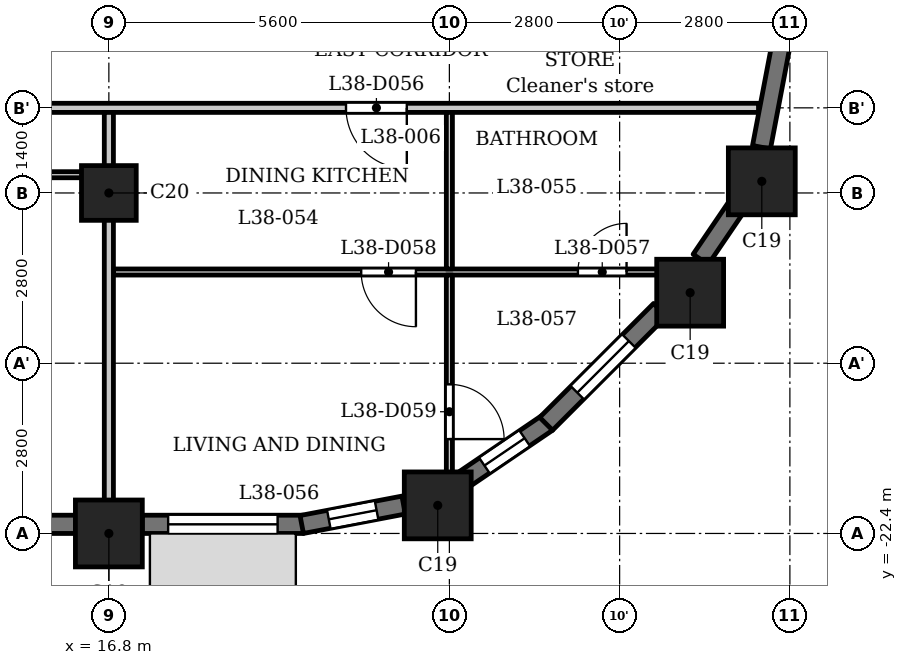
"""IFC4 building model, lengths in metres.
Left out: names, types, materials, properties, quantities, classifications, styles, units other than length and angle.
Written with IfcOpenShell. Run it as: python <this file> out.ifc"""

import sys

from ifc_helpers import new_model, si_unit, direction, frame, frame_2d, origin, origin_2d, place, context, subcontext, project, spatial, rectangle, extrude, element, fill, save


model = new_model("IFC4")
c1 = context("Model", 3, precision=1e-05, world=origin(), true_north=direction((0.0, 1.0)))
c2 = subcontext(c1, "Body", "Model", "MODEL_VIEW")
j1 = project(units=[si_unit("LENGTHUNIT", "METRE"), si_unit("PLANEANGLEUNIT", "RADIAN")], contexts=[c1])
p1 = place(None, origin())
s1 = spatial("IfcSite", under=j1, at=p1, CompositionType="ELEMENT")
p2 = place(p1, origin())
s2 = spatial("IfcBuilding", under=s1, at=p2, CompositionType="ELEMENT")
p3 = place(p2, frame((0.0, 0.0, 150.1)))
s3 = spatial("IfcBuildingStorey", under=s2, at=p3, CompositionType="ELEMENT", Elevation=150.1)
for number, where, z_axis, x_axis in (
    (1, (16.8, -22.4, 0.0), (0.0, 0.0, 1.0), (1.0, 0.0, 0.0)),
    (2, (22.209, -21.938, 0.0), (0.0, 0.0, 1.0), (1.0, 0.0, 0.0)),
    (3, (26.36, -18.44, 0.0), (0.0, 0.0, 1.0), (1.0, 0.0, 0.0)),
    (4, (27.538, -16.609, 0.0), (0.0, 0.0, 1.0), (1.0, 0.0, 0.0)),
):
    element("IfcColumn", number, at=place(p3, frame(where, z_axis=z_axis, x_axis=x_axis)), inside=s3, PredefinedType="COLUMN", context=c2, shape_type="SweptSolid", body=[
        extrude(rectangle(XDim=1.1, YDim=1.1, at=origin_2d()), origin(), (0.0, 0.0, 1.0), 3.5),
    ])
p4 = place(p3, frame((16.8, -16.8, 0.0), z_axis=(0.0, 0.0, 1.0), x_axis=(1.0, 0.0, 0.0)))
e5 = element("IfcColumn", 5, at=p4, inside=s3, PredefinedType="COLUMN", context=c2, shape_type="SweptSolid", body=[
    extrude(rectangle(XDim=0.9, YDim=0.9, at=origin_2d()), origin(), (0.0, 0.0, 1.0), 3.5),
])
p5 = place(p3, frame((11.75, -22.25, 0.0), z_axis=(0.0, 0.0, 1.0), x_axis=(1.0, 0.0, 0.0)))
e6 = element("IfcWall", 6, at=p5, inside=s3, PredefinedType="SOLIDWALL", context=c2, shape_type="SweptSolid", body=[
    extrude(rectangle(XDim=4.5, YDim=0.3, at=frame_2d((2.25, 0.0))), origin(), (0.0, 0.0, 1.0), 2.45),
])
p6 = place(p5, frame((0.45, 0.0, 1.2)))
e7 = element("IfcOpeningElement", 7, at=p6, cuts=e6, PredefinedType="OPENING", context=c2, shape_type="SweptSolid", body=[
    extrude(rectangle(XDim=3.6, YDim=0.95, at=frame_2d((1.8, 0.475))), frame((0.0, 0.16, 0.0), z_axis=(0.0, -1.0, 0.0), x_axis=(1.0, 0.0, 0.0)), (0.0, 0.0, 1.0), 0.32),
])
p7 = place(p3, frame((17.35, -22.25, 0.0), z_axis=(0.0, 0.0, 1.0), x_axis=(1.0, 0.0, 0.0)))
e8 = element("IfcWall", 8, at=p7, inside=s3, PredefinedType="SOLIDWALL", context=c2, shape_type="SweptSolid", body=[
    extrude(rectangle(XDim=2.65, YDim=0.3, at=frame_2d((1.325, 0.0))), origin(), (0.0, 0.0, 1.0), 2.45),
])
p8 = place(p7, frame((0.425, 0.0, 0.9)))
e9 = element("IfcOpeningElement", 9, at=p8, cuts=e8, PredefinedType="OPENING", context=c2, shape_type="SweptSolid", body=[
    extrude(rectangle(XDim=1.8, YDim=1.25, at=frame_2d((0.9, 0.625))), frame((0.0, 0.16, 0.0), z_axis=(0.0, -1.0, 0.0), x_axis=(1.0, 0.0, 0.0)), (0.0, 0.0, 1.0), 0.32),
])
p9 = place(p3, frame((19.972, -22.253, 0.0), z_axis=(0.0, 0.0, 1.0), x_axis=(0.982297206936, 0.187329114784, 0.0)))
e10 = element("IfcWall", 10, at=p9, inside=s3, PredefinedType="SOLIDWALL", context=c2, shape_type="SweptSolid", body=[
    extrude(rectangle(XDim=1.706, YDim=0.3, at=frame_2d((0.853, 0.0))), origin(), (0.0, 0.0, 1.0), 2.45),
])
p10 = place(p9, frame((0.453, 0.0, 0.6)))
e11 = element("IfcOpeningElement", 11, at=p10, cuts=e10, PredefinedType="OPENING", context=c2, shape_type="SweptSolid", body=[
    extrude(rectangle(XDim=0.8, YDim=1.55, at=frame_2d((0.4, 0.775))), frame((0.0, 0.16, 0.0), z_axis=(0.0, -1.0, 0.0), x_axis=(1.0, 0.0, 0.0)), (0.0, 0.0, 1.0), 0.32),
])
p11 = place(p3, frame((22.602, -21.538, 0.0), z_axis=(0.0, 0.0, 1.0), x_axis=(0.827040942766, 0.562141689424, 0.0)))
e12 = element("IfcWall", 12, at=p11, inside=s3, PredefinedType="SOLIDWALL", context=c2, shape_type="SweptSolid", body=[
    extrude(rectangle(XDim=1.706, YDim=0.3, at=frame_2d((0.853, 0.0))), origin(), (0.0, 0.0, 1.0), 2.45),
])
p12 = place(p11, frame((0.453, 0.0, 0.6)))
e13 = element("IfcOpeningElement", 13, at=p12, cuts=e12, PredefinedType="OPENING", context=c2, shape_type="SweptSolid", body=[
    extrude(rectangle(XDim=0.8, YDim=1.55, at=frame_2d((0.4, 0.775))), frame((0.0, 0.16, 0.0), z_axis=(0.0, -1.0, 0.0), x_axis=(1.0, 0.0, 0.0)), (0.0, 0.0, 1.0), 0.32),
])
p13 = place(p3, frame((23.991, -20.597, 0.0), z_axis=(0.0, 0.0, 1.0), x_axis=(0.707106781187, 0.707106781187, 0.0)))
e14 = element("IfcWall", 14, at=p13, inside=s3, PredefinedType="SOLIDWALL", context=c2, shape_type="SweptSolid", body=[
    extrude(rectangle(XDim=2.65, YDim=0.3, at=frame_2d((1.325, 0.0))), origin(), (0.0, 0.0, 1.0), 2.45),
])
p14 = place(p13, frame((0.725, 0.0, 0.6)))
e15 = element("IfcOpeningElement", 15, at=p14, cuts=e14, PredefinedType="OPENING", context=c2, shape_type="SweptSolid", body=[
    extrude(rectangle(XDim=1.2, YDim=1.55, at=frame_2d((0.6, 0.775))), frame((0.0, 0.16, 0.0), z_axis=(0.0, -1.0, 0.0), x_axis=(1.0, 0.0, 0.0)), (0.0, 0.0, 1.0), 0.32),
])
p15 = place(p3, frame((26.532, -17.893, 0.0), z_axis=(0.0, 0.0, 1.0), x_axis=(0.562105419172, 0.82706559458, 0.0)))
e16 = element("IfcWall", 16, at=p15, inside=s3, PredefinedType="SOLIDWALL", context=c2, shape_type="SweptSolid", body=[
    extrude(rectangle(XDim=1.077, YDim=0.3, at=frame_2d((0.539, 0.0))), origin(), (0.0, 0.0, 1.0), 3.2),
])
p16 = place(p3, frame((27.533, -16.048, 0.0), z_axis=(0.0, 0.0, 1.0), x_axis=(0.187302784601, 0.982302227871, 0.0)))
e17 = element("IfcWall", 17, at=p16, inside=s3, PredefinedType="SOLIDWALL", context=c2, shape_type="SweptSolid", body=[
    extrude(rectangle(XDim=1.706, YDim=0.3, at=frame_2d((0.853, 0.0))), origin(), (0.0, 0.0, 1.0), 2.45),
])
p17 = place(p3, frame((16.875, -18.1, 0.0), z_axis=(0.0, 0.0, 1.0), x_axis=(1.0, 0.0, 0.0)))
e18 = element("IfcWall", 18, at=p17, inside=s3, PredefinedType="PARTITIONING", context=c2, shape_type="SweptSolid", body=[
    extrude(rectangle(XDim=9.565, YDim=0.1, at=frame_2d((4.782, 0.0))), origin(), (0.0, 0.0, 1.0), 3.2),
])
p18 = place(p17, frame((7.639, 0.0, 0.0)))
e19 = element("IfcOpeningElement", 19, at=p18, cuts=e18, PredefinedType="OPENING", context=c2, shape_type="SweptSolid", body=[
    extrude(rectangle(XDim=0.8, YDim=2.1, at=frame_2d((0.4, 1.05))), frame((0.0, 0.06, 0.0), z_axis=(0.0, -1.0, 0.0), x_axis=(1.0, 0.0, 0.0)), (0.0, 0.0, 1.0), 0.12),
])
p19 = place(p17, frame((4.075, 0.0, 0.0)))
e20 = element("IfcOpeningElement", 20, at=p19, cuts=e18, PredefinedType="OPENING", context=c2, shape_type="SweptSolid", body=[
    extrude(rectangle(XDim=0.9, YDim=2.1, at=frame_2d((0.45, 1.05))), frame((0.0, 0.06, 0.0), z_axis=(0.0, -1.0, 0.0), x_axis=(1.0, 0.0, 0.0)), (0.0, 0.0, 1.0), 0.12),
])
p20 = place(p3, frame((-16.725, -16.5, 0.0), z_axis=(0.0, 0.0, 1.0), x_axis=(1.0, 0.0, 0.0)))
e21 = element("IfcWall", 21, at=p20, inside=s3, PredefinedType="PARTITIONING", context=c2, shape_type="SweptSolid", body=[
    extrude(rectangle(XDim=33.45, YDim=0.1, at=frame_2d((16.725, 0.0))), origin(), (0.0, 0.0, 1.0), 3.2),
])
p21 = place(p20, frame((9.675, 0.0, 0.0)))
e22 = element("IfcOpeningElement", 22, at=p21, cuts=e21, PredefinedType="OPENING", context=c2, shape_type="SweptSolid", body=[
    extrude(rectangle(XDim=0.8, YDim=2.1, at=frame_2d((0.4, 1.05))), frame((0.0, 0.06, 0.0), z_axis=(0.0, -1.0, 0.0), x_axis=(1.0, 0.0, 0.0)), (0.0, 0.0, 1.0), 0.12),
])
p22 = place(p20, frame((4.075, 0.0, 0.0)))
e23 = element("IfcOpeningElement", 23, at=p22, cuts=e21, PredefinedType="OPENING", context=c2, shape_type="SweptSolid", body=[
    extrude(rectangle(XDim=0.9, YDim=2.1, at=frame_2d((0.45, 1.05))), frame((0.0, 0.06, 0.0), z_axis=(0.0, -1.0, 0.0), x_axis=(1.0, 0.0, 0.0)), (0.0, 0.0, 1.0), 0.12),
])
p23 = place(p20, frame((20.875, 0.0, 0.0)))
e24 = element("IfcOpeningElement", 24, at=p23, cuts=e21, PredefinedType="OPENING", context=c2, shape_type="SweptSolid", body=[
    extrude(rectangle(XDim=0.8, YDim=2.1, at=frame_2d((0.4, 1.05))), frame((0.0, 0.06, 0.0), z_axis=(0.0, -1.0, 0.0), x_axis=(1.0, 0.0, 0.0)), (0.0, 0.0, 1.0), 0.12),
])
p24 = place(p20, frame((15.275, 0.0, 0.0)))
e25 = element("IfcOpeningElement", 25, at=p24, cuts=e21, PredefinedType="OPENING", context=c2, shape_type="SweptSolid", body=[
    extrude(rectangle(XDim=0.9, YDim=2.1, at=frame_2d((0.45, 1.05))), frame((0.0, 0.06, 0.0), z_axis=(0.0, -1.0, 0.0), x_axis=(1.0, 0.0, 0.0)), (0.0, 0.0, 1.0), 0.12),
])
p25 = place(p20, frame((26.475, 0.0, 0.0)))
e26 = element("IfcOpeningElement", 26, at=p25, cuts=e21, PredefinedType="OPENING", context=c2, shape_type="SweptSolid", body=[
    extrude(rectangle(XDim=0.8, YDim=2.1, at=frame_2d((0.4, 1.05))), frame((0.0, 0.06, 0.0), z_axis=(0.0, -1.0, 0.0), x_axis=(1.0, 0.0, 0.0)), (0.0, 0.0, 1.0), 0.12),
])
p26 = place(p20, frame((30.575, 0.0, 0.0)))
e27 = element("IfcOpeningElement", 27, at=p26, cuts=e21, PredefinedType="OPENING", context=c2, shape_type="SweptSolid", body=[
    extrude(rectangle(XDim=0.9, YDim=2.1, at=frame_2d((0.45, 1.05))), frame((0.0, 0.06, 0.0), z_axis=(0.0, -1.0, 0.0), x_axis=(1.0, 0.0, 0.0)), (0.0, 0.0, 1.0), 0.12),
])
p27 = place(p3, frame((14.925, -15.4, 0.0), z_axis=(0.0, 0.0, 1.0), x_axis=(1.0, 0.0, 0.0)))
e28 = element("IfcWall", 28, at=p27, inside=s3, PredefinedType="PARTITIONING", context=c2, shape_type="SweptSolid", body=[
    extrude(rectangle(XDim=12.559, YDim=0.15, at=frame_2d((6.279, 0.0))), origin(), (0.0, 0.0, 1.0), 3.2),
])
p28 = place(p27, frame((5.775, 0.0, 0.0)))
e29 = element("IfcOpeningElement", 29, at=p28, cuts=e28, PredefinedType="OPENING", context=c2, shape_type="SweptSolid", body=[
    extrude(rectangle(XDim=1.0, YDim=2.1, at=frame_2d((0.5, 1.05))), frame((0.0, 0.085, 0.0), z_axis=(0.0, -1.0, 0.0), x_axis=(1.0, 0.0, 0.0)), (0.0, 0.0, 1.0), 0.17),
])
p29 = place(p3, frame((16.8, -22.93, 0.0), z_axis=(0.0, 0.0, 1.0), x_axis=(0.0, 1.0, 0.0)))
e30 = element("IfcWall", 30, at=p29, inside=s3, PredefinedType="PARTITIONING", context=c2, shape_type="SweptSolid", body=[
    extrude(rectangle(XDim=7.455, YDim=0.15, at=frame_2d((3.728, 0.0))), origin(), (0.0, 0.0, 1.0), 3.2),
])
p30 = place(p3, frame((22.4, -21.72, 0.0), z_axis=(0.0, 0.0, 1.0), x_axis=(0.0, 1.0, 0.0)))
e31 = element("IfcWall", 31, at=p30, inside=s3, PredefinedType="PARTITIONING", context=c2, shape_type="SweptSolid", body=[
    extrude(rectangle(XDim=3.57, YDim=0.1, at=frame_2d((1.785, 0.0))), origin(), (0.0, 0.0, 1.0), 3.2),
])
p31 = place(p30, frame((0.872, 0.0, 0.0)))
e32 = element("IfcOpeningElement", 32, at=p31, cuts=e31, PredefinedType="OPENING", context=c2, shape_type="SweptSolid", body=[
    extrude(rectangle(XDim=0.9, YDim=2.1, at=frame_2d((0.45, 1.05))), frame((0.0, 0.06, 0.0), z_axis=(0.0, -1.0, 0.0), x_axis=(1.0, 0.0, 0.0)), (0.0, 0.0, 1.0), 0.12),
])
p32 = place(p3, frame((22.4, -18.05, 0.0), z_axis=(0.0, 0.0, 1.0), x_axis=(0.0, 1.0, 0.0)))
e33 = element("IfcWall", 33, at=p32, inside=s3, PredefinedType="PARTITIONING", context=c2, shape_type="SweptSolid", body=[
    extrude(rectangle(XDim=2.575, YDim=0.1, at=frame_2d((1.288, 0.0))), origin(), (0.0, 0.0, 1.0), 3.2),
])
p33 = place(p28, origin())
e34 = element("IfcDoor", 34, at=p33, inside=s3, OperationType="SINGLE_SWING_RIGHT", PredefinedType="DOOR", context=c2, shape_type="SweptSolid", body=[
    extrude(rectangle(XDim=1.0, YDim=2.1, at=frame_2d((0.5, 1.05))), frame((0.0, 0.025, 0.0), z_axis=(0.0, -1.0, 0.0), x_axis=(1.0, 0.0, 0.0)), (0.0, 0.0, 1.0), 0.05),
])
fill(e29, e34)
p34 = place(p18, origin())
e35 = element("IfcDoor", 35, at=p34, inside=s3, OperationType="SINGLE_SWING_LEFT", PredefinedType="DOOR", context=c2, shape_type="SweptSolid", body=[
    extrude(rectangle(XDim=0.8, YDim=2.1, at=frame_2d((0.4, 1.05))), frame((0.0, 0.025, 0.0), z_axis=(0.0, -1.0, 0.0), x_axis=(1.0, 0.0, 0.0)), (0.0, 0.0, 1.0), 0.05),
])
fill(e19, e35)
p35 = place(p19, origin())
e36 = element("IfcDoor", 36, at=p35, inside=s3, OperationType="SINGLE_SWING_RIGHT", PredefinedType="DOOR", context=c2, shape_type="SweptSolid", body=[
    extrude(rectangle(XDim=0.9, YDim=2.1, at=frame_2d((0.45, 1.05))), frame((0.0, 0.025, 0.0), z_axis=(0.0, -1.0, 0.0), x_axis=(1.0, 0.0, 0.0)), (0.0, 0.0, 1.0), 0.05),
])
fill(e20, e36)
p36 = place(p31, origin())
e37 = element("IfcDoor", 37, at=p36, inside=s3, OperationType="SINGLE_SWING_LEFT", PredefinedType="DOOR", context=c2, shape_type="SweptSolid", body=[
    extrude(rectangle(XDim=0.9, YDim=2.1, at=frame_2d((0.45, 1.05))), frame((0.0, 0.025, 0.0), z_axis=(0.0, -1.0, 0.0), x_axis=(1.0, 0.0, 0.0)), (0.0, 0.0, 1.0), 0.05),
])
fill(e32, e37)
p37 = place(p8, origin())
e38 = element("IfcWindow", 38, at=p37, inside=s3, PartitioningType="SINGLE_PANEL", PredefinedType="WINDOW", context=c2, shape_type="SweptSolid", body=[
    extrude(rectangle(XDim=1.8, YDim=1.25, at=frame_2d((0.9, 0.625))), frame((0.0, 0.03, 0.0), z_axis=(0.0, -1.0, 0.0), x_axis=(1.0, 0.0, 0.0)), (0.0, 0.0, 1.0), 0.06),
])
fill(e9, e38)
p38 = place(p10, origin())
e39 = element("IfcWindow", 39, at=p38, inside=s3, PartitioningType="SINGLE_PANEL", PredefinedType="WINDOW", context=c2, shape_type="SweptSolid", body=[
    extrude(rectangle(XDim=0.8, YDim=1.55, at=frame_2d((0.4, 0.775))), frame((0.0, 0.03, 0.0), z_axis=(0.0, -1.0, 0.0), x_axis=(1.0, 0.0, 0.0)), (0.0, 0.0, 1.0), 0.06),
])
fill(e11, e39)
p39 = place(p12, origin())
e40 = element("IfcWindow", 40, at=p39, inside=s3, PartitioningType="SINGLE_PANEL", PredefinedType="WINDOW", context=c2, shape_type="SweptSolid", body=[
    extrude(rectangle(XDim=0.8, YDim=1.55, at=frame_2d((0.4, 0.775))), frame((0.0, 0.03, 0.0), z_axis=(0.0, -1.0, 0.0), x_axis=(1.0, 0.0, 0.0)), (0.0, 0.0, 1.0), 0.06),
])
fill(e13, e40)
p40 = place(p14, origin())
e41 = element("IfcWindow", 41, at=p40, inside=s3, PartitioningType="SINGLE_PANEL", PredefinedType="WINDOW", context=c2, shape_type="SweptSolid", body=[
    extrude(rectangle(XDim=1.2, YDim=1.55, at=frame_2d((0.6, 0.775))), frame((0.0, 0.03, 0.0), z_axis=(0.0, -1.0, 0.0), x_axis=(1.0, 0.0, 0.0)), (0.0, 0.0, 1.0), 0.06),
])
fill(e15, e41)
save(model, sys.argv[1])
